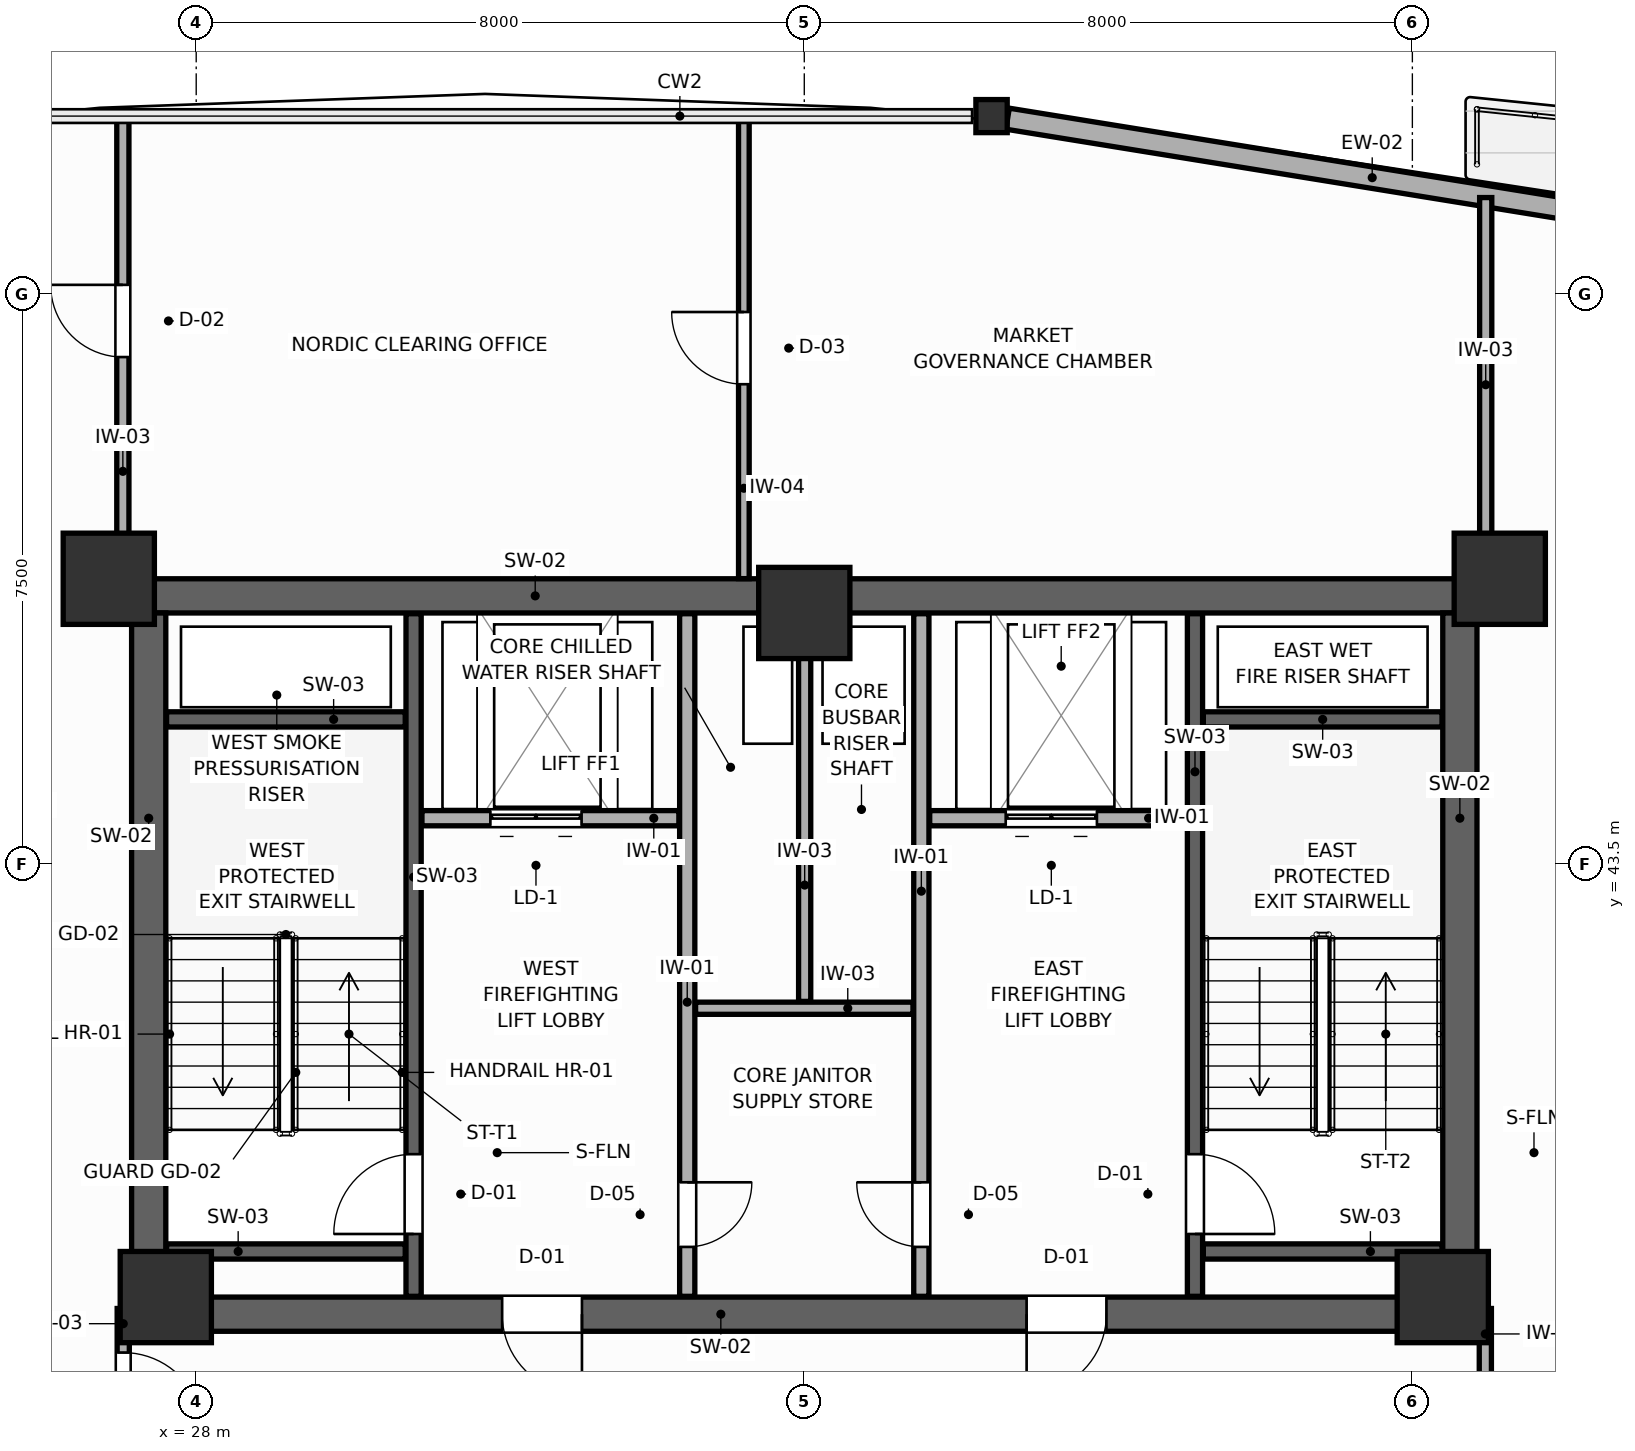
"""IFC4 building model, lengths in metres.
Left out: names, types, materials, properties, quantities, classifications, styles, units other than length and angle.
Written with IfcOpenShell. Run it as: python <this file> out.ifc"""

import sys

from ifc_helpers import new_model, si_unit, direction, frame, frame_2d, origin, origin_2d, place, context, subcontext, project, spatial, rectangle, i_section, extrude, source, transform, mapped, element, fill, save


model = new_model("IFC4")
c1 = context("Model", 3, precision=1e-05, world=origin(), true_north=direction((0.0, 1.0)))
c2 = subcontext(c1, "Body", "Model", "MODEL_VIEW")
j1 = project(units=[si_unit("LENGTHUNIT", "METRE"), si_unit("PLANEANGLEUNIT", "RADIAN")], contexts=[c1])
p1 = place(None, origin())
s1 = spatial("IfcSite", under=j1, at=p1, CompositionType="ELEMENT")
p2 = place(p1, origin())
s2 = spatial("IfcBuilding", under=s1, at=p2, CompositionType="ELEMENT")
p3 = place(p2, frame((0.0, 0.0, 136.2)))
s3 = spatial("IfcBuildingStorey", under=s2, at=p3, CompositionType="ELEMENT", Elevation=136.2)
p4 = place(p3, frame((27.15, 47.025, 0.0), z_axis=(0.0, 0.0, 1.0), x_axis=(1.0, 0.0, 0.0)))
e1 = element("IfcWall", 1, at=p4, inside=s3, PredefinedType="SHEAR", context=c2, shape_type="SweptSolid", body=[
    extrude(rectangle(XDim=17.7, YDim=0.45, at=frame_2d((8.85, 0.0))), origin(), (0.0, 0.0, 1.0), 3.6),
])
p5 = place(p3, frame((27.15, 37.575, 0.0), z_axis=(0.0, 0.0, 1.0), x_axis=(1.0, 0.0, 0.0)))
e2 = element("IfcWall", 2, at=p5, inside=s3, PredefinedType="SHEAR", context=c2, shape_type="SweptSolid", body=[
    extrude(rectangle(XDim=17.7, YDim=0.45, at=frame_2d((8.85, 0.0))), origin(), (0.0, 0.0, 1.0), 3.6),
])
p6 = place(p5, frame((4.875, 0.0, 0.0)))
e3 = element("IfcOpeningElement", 3, at=p6, cuts=e2, PredefinedType="OPENING", context=c2, shape_type="SweptSolid", body=[
    extrude(rectangle(XDim=1.05, YDim=2.1, at=frame_2d((0.525, 1.05))), frame((0.0, 0.235, 0.0), z_axis=(0.0, -1.0, 0.0), x_axis=(1.0, 0.0, 0.0)), (0.0, 0.0, 1.0), 0.47),
])
p7 = place(p5, frame((11.775, 0.0, 0.0)))
e4 = element("IfcOpeningElement", 4, at=p7, cuts=e2, PredefinedType="OPENING", context=c2, shape_type="SweptSolid", body=[
    extrude(rectangle(XDim=1.05, YDim=2.1, at=frame_2d((0.525, 1.05))), frame((0.0, 0.235, 0.0), z_axis=(0.0, -1.0, 0.0), x_axis=(1.0, 0.0, 0.0)), (0.0, 0.0, 1.0), 0.47),
])
for number, where, z_axis, x_axis in (
    (5, (27.375, 37.8, 0.0), (0.0, 0.0, 1.0), (0.0, 1.0, 0.0)),
    (6, (44.625, 37.8, 0.0), (0.0, 0.0, 1.0), (0.0, 1.0, 0.0)),
):
    element("IfcWall", number, at=place(p3, frame(where, z_axis=z_axis, x_axis=x_axis)), inside=s3, PredefinedType="SHEAR", context=c2, shape_type="SweptSolid", body=[
        extrude(rectangle(XDim=9.0, YDim=0.45, at=frame_2d((4.5, 0.0))), origin(), (0.0, 0.0, 1.0), 3.6),
    ])
m1 = source(origin(), c2, "Body", "SweptSolid", [
    extrude(rectangle(XDim=1.2, YDim=1.2, at=origin_2d()), origin(), (0.0, 0.0, 1.0), 3.6),
])
for number, where, z_axis, x_axis in (
    (7, (26.85, 47.25, 0.0), (0.0, 0.0, 1.0), (1.0, 0.0, 0.0)),
    (8, (45.15, 47.25, 0.0), (0.0, 0.0, 1.0), (1.0, 0.0, 0.0)),
    (9, (27.6, 37.8, 0.0), (0.0, 0.0, 1.0), (1.0, 0.0, 0.0)),
    (10, (44.4, 37.8, 0.0), (0.0, 0.0, 1.0), (1.0, 0.0, 0.0)),
    (11, (36.0, 46.8, 0.0), (0.0, 0.0, 1.0), (1.0, 0.0, 0.0)),
):
    element("IfcColumn", number, at=place(p3, frame(where, z_axis=z_axis, x_axis=x_axis)), inside=s3, PredefinedType="COLUMN", context=c2, shape_type="MappedRepresentation", body=[
        mapped(m1, transform((0.0, 0.0, 0.0), scale=1.0)),
    ])
m2 = source(origin(), c2, "Body", "SweptSolid", [
    extrude(i_section(OverallWidth=0.412, OverallDepth=0.435, WebThickness=0.033, FlangeThickness=0.053, FilletRadius=0.015, at=origin_2d()), origin(), (0.0, 0.0, 1.0), 3.6),
])
p8 = place(p3, frame((38.464, 53.337, 0.0), z_axis=(0.0, 0.0, 1.0), x_axis=(1.0, 0.0, 0.0)))
e12 = element("IfcColumn", 12, at=p8, inside=s3, PredefinedType="COLUMN", context=c2, shape_type="MappedRepresentation", body=[
    mapped(m2, transform((0.0, 0.0, 0.0), scale=1.0)),
])
p9 = place(p3, frame((53.646, 50.881, 0.0), z_axis=(0.0, 0.0, 1.0), x_axis=(-0.987165905884, 0.159698072185, 0.0)))
e13 = element("IfcWall", 13, at=p9, inside=s3, PredefinedType="SOLIDWALL", context=c2, shape_type="SweptSolid", body=[
    extrude(rectangle(XDim=15.165, YDim=0.28, at=frame_2d((7.583, 0.0))), origin(), (0.0, 0.0, 1.0), 3.0),
])
p10 = place(p9, frame((3.566, 0.0, 0.75)))
e14 = element("IfcOpeningElement", 14, at=p10, cuts=e13, PredefinedType="OPENING", context=c2, shape_type="SweptSolid", body=[
    extrude(rectangle(XDim=1.7, YDim=1.75, at=frame_2d((0.85, 0.875))), frame((0.0, 0.15, 0.0), z_axis=(0.0, -1.0, 0.0), x_axis=(1.0, 0.0, 0.0)), (0.0, 0.0, 1.0), 0.3),
])
p11 = place(p3, frame((30.86, 37.81, 0.0), z_axis=(0.0, 0.0, 1.0), x_axis=(0.0, 1.0, 0.0)))
e15 = element("IfcWall", 15, at=p11, inside=s3, PredefinedType="SHEAR", context=c2, shape_type="SweptSolid", body=[
    extrude(rectangle(XDim=8.98, YDim=0.2, at=frame_2d((4.49, 0.0))), origin(), (0.0, 0.0, 1.0), 3.6),
])
p12 = place(p11, frame((0.82, 0.0, 0.0)))
e16 = element("IfcOpeningElement", 16, at=p12, cuts=e15, PredefinedType="OPENING", context=c2, shape_type="SweptSolid", body=[
    extrude(rectangle(XDim=1.05, YDim=2.1, at=frame_2d((0.525, 1.05))), frame((0.0, 0.11, 0.0), z_axis=(0.0, -1.0, 0.0), x_axis=(1.0, 0.0, 0.0)), (0.0, 0.0, 1.0), 0.22),
])
for number, where, z_axis, x_axis in (
    (17, (27.61, 45.4, 0.0), (0.0, 0.0, 1.0), (1.0, 0.0, 0.0)),
    (18, (27.61, 38.4, 0.0), (0.0, 0.0, 1.0), (1.0, 0.0, 0.0)),
):
    element("IfcWall", number, at=place(p3, frame(where, z_axis=z_axis, x_axis=x_axis)), inside=s3, PredefinedType="SHEAR", context=c2, shape_type="SweptSolid", body=[
        extrude(rectangle(XDim=3.14, YDim=0.2, at=frame_2d((1.57, 0.0))), origin(), (0.0, 0.0, 1.0), 3.6),
    ])
p13 = place(p3, frame((41.14, 37.81, 0.0), z_axis=(0.0, 0.0, 1.0), x_axis=(0.0, 1.0, 0.0)))
e19 = element("IfcWall", 19, at=p13, inside=s3, PredefinedType="SHEAR", context=c2, shape_type="SweptSolid", body=[
    extrude(rectangle(XDim=8.98, YDim=0.2, at=frame_2d((4.49, 0.0))), origin(), (0.0, 0.0, 1.0), 3.6),
])
p14 = place(p13, frame((0.82, 0.0, 0.0)))
e20 = element("IfcOpeningElement", 20, at=p14, cuts=e19, PredefinedType="OPENING", context=c2, shape_type="SweptSolid", body=[
    extrude(rectangle(XDim=1.05, YDim=2.1, at=frame_2d((0.525, 1.05))), frame((0.0, 0.11, 0.0), z_axis=(0.0, -1.0, 0.0), x_axis=(1.0, 0.0, 0.0)), (0.0, 0.0, 1.0), 0.22),
])
for number, where, z_axis, x_axis in (
    (21, (41.25, 45.4, 0.0), (0.0, 0.0, 1.0), (1.0, 0.0, 0.0)),
    (22, (41.25, 38.4, 0.0), (0.0, 0.0, 1.0), (1.0, 0.0, 0.0)),
):
    element("IfcWall", number, at=place(p3, frame(where, z_axis=z_axis, x_axis=x_axis)), inside=s3, PredefinedType="SHEAR", context=c2, shape_type="SweptSolid", body=[
        extrude(rectangle(XDim=3.14, YDim=0.2, at=frame_2d((1.57, 0.0))), origin(), (0.0, 0.0, 1.0), 3.6),
    ])
p15 = place(p3, frame((30.97, 44.1, 0.0), z_axis=(0.0, 0.0, 1.0), x_axis=(1.0, 0.0, 0.0)))
e23 = element("IfcWall", 23, at=p15, inside=s3, PredefinedType="PARTITIONING", context=c2, shape_type="SweptSolid", body=[
    extrude(rectangle(XDim=3.38, YDim=0.2, at=frame_2d((1.69, 0.0))), origin(), (0.0, 0.0, 1.0), 3.4),
])
p16 = place(p15, frame((0.9, 0.0, 0.0)))
e24 = element("IfcOpeningElement", 24, at=p16, cuts=e23, PredefinedType="OPENING", context=c2, shape_type="SweptSolid", body=[
    extrude(rectangle(XDim=1.2, YDim=2.1, at=frame_2d((0.6, 1.05))), frame((0.0, 0.11, 0.0), z_axis=(0.0, -1.0, 0.0), x_axis=(1.0, 0.0, 0.0)), (0.0, 0.0, 1.0), 0.22),
])
p17 = place(p3, frame((37.65, 44.1, 0.0), z_axis=(0.0, 0.0, 1.0), x_axis=(1.0, 0.0, 0.0)))
e25 = element("IfcWall", 25, at=p17, inside=s3, PredefinedType="PARTITIONING", context=c2, shape_type="SweptSolid", body=[
    extrude(rectangle(XDim=3.38, YDim=0.2, at=frame_2d((1.69, 0.0))), origin(), (0.0, 0.0, 1.0), 3.4),
])
p18 = place(p17, frame((1.0, 0.0, 0.0)))
e26 = element("IfcOpeningElement", 26, at=p18, cuts=e25, PredefinedType="OPENING", context=c2, shape_type="SweptSolid", body=[
    extrude(rectangle(XDim=1.2, YDim=2.1, at=frame_2d((0.6, 1.05))), frame((0.0, 0.11, 0.0), z_axis=(0.0, -1.0, 0.0), x_axis=(1.0, 0.0, 0.0)), (0.0, 0.0, 1.0), 0.22),
])
p19 = place(p3, frame((34.46, 37.81, 0.0), z_axis=(0.0, 0.0, 1.0), x_axis=(0.0, 1.0, 0.0)))
e27 = element("IfcWall", 27, at=p19, inside=s3, PredefinedType="PARTITIONING", context=c2, shape_type="SweptSolid", body=[
    extrude(rectangle(XDim=8.98, YDim=0.2, at=frame_2d((4.49, 0.0))), origin(), (0.0, 0.0, 1.0), 3.4),
])
p20 = place(p19, frame((0.65, 0.0, 0.0)))
e28 = element("IfcOpeningElement", 28, at=p20, cuts=e27, PredefinedType="OPENING", context=c2, shape_type="SweptSolid", body=[
    extrude(rectangle(XDim=0.85, YDim=2.05, at=frame_2d((0.425, 1.025))), frame((0.0, 0.11, 0.0), z_axis=(0.0, -1.0, 0.0), x_axis=(1.0, 0.0, 0.0)), (0.0, 0.0, 1.0), 0.22),
])
p21 = place(p3, frame((37.54, 37.81, 0.0), z_axis=(0.0, 0.0, 1.0), x_axis=(0.0, 1.0, 0.0)))
e29 = element("IfcWall", 29, at=p21, inside=s3, PredefinedType="PARTITIONING", context=c2, shape_type="SweptSolid", body=[
    extrude(rectangle(XDim=8.98, YDim=0.2, at=frame_2d((4.49, 0.0))), origin(), (0.0, 0.0, 1.0), 3.4),
])
p22 = place(p21, frame((0.65, 0.0, 0.0)))
e30 = element("IfcOpeningElement", 30, at=p22, cuts=e29, PredefinedType="OPENING", context=c2, shape_type="SweptSolid", body=[
    extrude(rectangle(XDim=0.85, YDim=2.05, at=frame_2d((0.425, 1.025))), frame((0.0, 0.11, 0.0), z_axis=(0.0, -1.0, 0.0), x_axis=(1.0, 0.0, 0.0)), (0.0, 0.0, 1.0), 0.22),
])
p23 = place(p3, frame((34.57, 41.6, 0.0), z_axis=(0.0, 0.0, 1.0), x_axis=(1.0, 0.0, 0.0)))
e31 = element("IfcWall", 31, at=p23, inside=s3, PredefinedType="PARTITIONING", context=c2, shape_type="SweptSolid", body=[
    extrude(rectangle(XDim=2.86, YDim=0.16, at=frame_2d((1.43, 0.0))), origin(), (0.0, 0.0, 1.0), 3.4),
])
p24 = place(p3, frame((36.005, 41.69, 0.0), z_axis=(0.0, 0.0, 1.0), x_axis=(0.0, 1.0, 0.0)))
e32 = element("IfcWall", 32, at=p24, inside=s3, PredefinedType="PARTITIONING", context=c2, shape_type="SweptSolid", body=[
    extrude(rectangle(XDim=5.1, YDim=0.16, at=frame_2d((2.55, 0.0))), origin(), (0.0, 0.0, 1.0), 3.4),
])
p25 = place(p3, frame((27.04, 35.54, 0.0), z_axis=(0.0, 0.0, 1.0), x_axis=(0.0, 1.0, 0.0)))
e33 = element("IfcWall", 33, at=p25, inside=s3, PredefinedType="PARTITIONING", context=c2, shape_type="SweptSolid", body=[
    extrude(rectangle(XDim=2.11, YDim=0.16, at=frame_2d((1.055, 0.0))), origin(), (0.0, 0.0, 1.0), 3.4),
])
p26 = place(p25, frame((0.48, 0.0, 0.0)))
e34 = element("IfcOpeningElement", 34, at=p26, cuts=e33, PredefinedType="OPENING", context=c2, shape_type="SweptSolid", body=[
    extrude(rectangle(XDim=1.05, YDim=2.1, at=frame_2d((0.525, 1.05))), frame((0.0, 0.09, 0.0), z_axis=(0.0, -1.0, 0.0), x_axis=(1.0, 0.0, 0.0)), (0.0, 0.0, 1.0), 0.18),
])
p27 = place(p3, frame((44.96, 35.0, 0.0), z_axis=(0.0, 0.0, 1.0), x_axis=(0.0, 1.0, 0.0)))
e35 = element("IfcWall", 35, at=p27, inside=s3, PredefinedType="PARTITIONING", context=c2, shape_type="SweptSolid", body=[
    extrude(rectangle(XDim=2.65, YDim=0.16, at=frame_2d((1.325, 0.0))), origin(), (0.0, 0.0, 1.0), 3.4),
])
p28 = place(p27, frame((0.75, 0.0, 0.0)))
e36 = element("IfcOpeningElement", 36, at=p28, cuts=e35, PredefinedType="OPENING", context=c2, shape_type="SweptSolid", body=[
    extrude(rectangle(XDim=1.05, YDim=2.1, at=frame_2d((0.525, 1.05))), frame((0.0, 0.09, 0.0), z_axis=(0.0, -1.0, 0.0), x_axis=(1.0, 0.0, 0.0)), (0.0, 0.0, 1.0), 0.18),
])
p29 = place(p3, frame((27.035, 47.34, 0.0), z_axis=(0.0, 0.0, 1.0), x_axis=(0.0, 1.0, 0.0)))
e37 = element("IfcWall", 37, at=p29, inside=s3, PredefinedType="PARTITIONING", context=c2, shape_type="SweptSolid", body=[
    extrude(rectangle(XDim=5.977, YDim=0.16, at=frame_2d((2.988, 0.0))), origin(), (0.0, 0.0, 1.0), 3.4),
])
p30 = place(p29, frame((2.827, 0.0, 0.0)))
e38 = element("IfcOpeningElement", 38, at=p30, cuts=e37, PredefinedType="OPENING", context=c2, shape_type="SweptSolid", body=[
    extrude(rectangle(XDim=0.95, YDim=2.05, at=frame_2d((0.475, 1.025))), frame((0.0, 0.09, 0.0), z_axis=(0.0, -1.0, 0.0), x_axis=(1.0, 0.0, 0.0)), (0.0, 0.0, 1.0), 0.18),
])
p31 = place(p3, frame((44.965, 47.34, 0.0), z_axis=(0.0, 0.0, 1.0), x_axis=(0.0, 1.0, 0.0)))
e39 = element("IfcWall", 39, at=p31, inside=s3, PredefinedType="PARTITIONING", context=c2, shape_type="SweptSolid", body=[
    extrude(rectangle(XDim=4.925, YDim=0.16, at=frame_2d((2.463, 0.0))), origin(), (0.0, 0.0, 1.0), 3.4),
])
p32 = place(p3, frame((35.205, 47.252, 0.0), z_axis=(0.0, 0.0, 1.0), x_axis=(0.0, 1.0, 0.0)))
e40 = element("IfcWall", 40, at=p32, inside=s3, PredefinedType="PARTITIONING", context=c2, shape_type="SweptSolid", body=[
    extrude(rectangle(XDim=6.065, YDim=0.14, at=frame_2d((3.032, 0.0))), origin(), (0.0, 0.0, 1.0), 3.4),
])
p33 = place(p32, frame((2.558, 0.0, 0.0)))
e41 = element("IfcOpeningElement", 41, at=p33, cuts=e40, PredefinedType="OPENING", context=c2, shape_type="SweptSolid", body=[
    extrude(rectangle(XDim=0.95, YDim=2.05, at=frame_2d((0.475, 1.025))), frame((0.0, 0.08, 0.0), z_axis=(0.0, -1.0, 0.0), x_axis=(1.0, 0.0, 0.0)), (0.0, 0.0, 1.0), 0.16),
])
p34 = place(p12, origin())
e42 = element("IfcDoor", 42, at=p34, inside=s3, OperationType="SINGLE_SWING_LEFT", PredefinedType="DOOR", context=c2, shape_type="SweptSolid", body=[
    extrude(rectangle(XDim=1.05, YDim=2.1, at=frame_2d((0.525, 1.05))), frame((0.0, 0.025, 0.0), z_axis=(0.0, -1.0, 0.0), x_axis=(1.0, 0.0, 0.0)), (0.0, 0.0, 1.0), 0.05),
])
fill(e16, e42)
p35 = place(p14, frame((1.05, 0.0, 0.0), z_axis=(0.0, 0.0, 1.0), x_axis=(-1.0, 0.0, 0.0)))
e43 = element("IfcDoor", 43, at=p35, inside=s3, OperationType="SINGLE_SWING_RIGHT", PredefinedType="DOOR", context=c2, shape_type="SweptSolid", body=[
    extrude(rectangle(XDim=1.05, YDim=2.1, at=frame_2d((0.525, 1.05))), frame((0.0, 0.025, 0.0), z_axis=(0.0, -1.0, 0.0), x_axis=(1.0, 0.0, 0.0)), (0.0, 0.0, 1.0), 0.05),
])
fill(e20, e43)
p36 = place(p16, origin())
e44 = element("IfcDoor", 44, at=p36, inside=s3, OperationType="DOUBLE_DOOR_SLIDING", PredefinedType="DOOR", context=c2, shape_type="SweptSolid", body=[
    extrude(rectangle(XDim=1.2, YDim=2.1, at=frame_2d((0.6, 1.05))), frame((0.0, 0.025, 0.0), z_axis=(0.0, -1.0, 0.0), x_axis=(1.0, 0.0, 0.0)), (0.0, 0.0, 1.0), 0.05),
])
fill(e24, e44)
p37 = place(p18, origin())
e45 = element("IfcDoor", 45, at=p37, inside=s3, OperationType="DOUBLE_DOOR_SLIDING", PredefinedType="DOOR", context=c2, shape_type="SweptSolid", body=[
    extrude(rectangle(XDim=1.2, YDim=2.1, at=frame_2d((0.6, 1.05))), frame((0.0, 0.025, 0.0), z_axis=(0.0, -1.0, 0.0), x_axis=(1.0, 0.0, 0.0)), (0.0, 0.0, 1.0), 0.05),
])
fill(e26, e45)
p38 = place(p20, frame((0.85, 0.0, 0.0), z_axis=(0.0, 0.0, 1.0), x_axis=(-1.0, 0.0, 0.0)))
e46 = element("IfcDoor", 46, at=p38, inside=s3, OperationType="SINGLE_SWING_LEFT", PredefinedType="DOOR", context=c2, shape_type="SweptSolid", body=[
    extrude(rectangle(XDim=0.85, YDim=2.05, at=frame_2d((0.425, 1.025))), frame((0.0, 0.025, 0.0), z_axis=(0.0, -1.0, 0.0), x_axis=(1.0, 0.0, 0.0)), (0.0, 0.0, 1.0), 0.05),
])
fill(e28, e46)
p39 = place(p22, origin())
e47 = element("IfcDoor", 47, at=p39, inside=s3, OperationType="SINGLE_SWING_RIGHT", PredefinedType="DOOR", context=c2, shape_type="SweptSolid", body=[
    extrude(rectangle(XDim=0.85, YDim=2.05, at=frame_2d((0.425, 1.025))), frame((0.0, 0.025, 0.0), z_axis=(0.0, -1.0, 0.0), x_axis=(1.0, 0.0, 0.0)), (0.0, 0.0, 1.0), 0.05),
])
fill(e30, e47)
p40 = place(p26, frame((1.05, 0.0, 0.0), z_axis=(0.0, 0.0, 1.0), x_axis=(-1.0, 0.0, 0.0)))
e48 = element("IfcDoor", 48, at=p40, inside=s3, OperationType="SINGLE_SWING_RIGHT", PredefinedType="DOOR", context=c2, shape_type="SweptSolid", body=[
    extrude(rectangle(XDim=1.05, YDim=2.1, at=frame_2d((0.525, 1.05))), frame((0.0, 0.025, 0.0), z_axis=(0.0, -1.0, 0.0), x_axis=(1.0, 0.0, 0.0)), (0.0, 0.0, 1.0), 0.05),
])
fill(e34, e48)
p41 = place(p30, origin())
e49 = element("IfcDoor", 49, at=p41, inside=s3, OperationType="SINGLE_SWING_RIGHT", PredefinedType="DOOR", context=c2, shape_type="SweptSolid", body=[
    extrude(rectangle(XDim=0.95, YDim=2.05, at=frame_2d((0.475, 1.025))), frame((0.0, 0.025, 0.0), z_axis=(0.0, -1.0, 0.0), x_axis=(1.0, 0.0, 0.0)), (0.0, 0.0, 1.0), 0.05),
])
fill(e38, e49)
p42 = place(p33, origin())
e50 = element("IfcDoor", 50, at=p42, inside=s3, OperationType="SINGLE_SWING_RIGHT", PredefinedType="DOOR", context=c2, shape_type="SweptSolid", body=[
    extrude(rectangle(XDim=0.95, YDim=2.05, at=frame_2d((0.475, 1.025))), frame((0.0, 0.025, 0.0), z_axis=(0.0, -1.0, 0.0), x_axis=(1.0, 0.0, 0.0)), (0.0, 0.0, 1.0), 0.05),
])
fill(e41, e50)
p43 = place(p6, frame((1.05, 0.0, 0.0), z_axis=(0.0, 0.0, 1.0), x_axis=(-1.0, 0.0, 0.0)))
e51 = element("IfcDoor", 51, at=p43, inside=s3, OperationType="SINGLE_SWING_LEFT", PredefinedType="DOOR", context=c2, shape_type="SweptSolid", body=[
    extrude(rectangle(XDim=1.05, YDim=2.1, at=frame_2d((0.525, 1.05))), frame((0.0, 0.025, 0.0), z_axis=(0.0, -1.0, 0.0), x_axis=(1.0, 0.0, 0.0)), (0.0, 0.0, 1.0), 0.05),
])
fill(e3, e51)
p44 = place(p7, frame((1.05, 0.0, 0.0), z_axis=(0.0, 0.0, 1.0), x_axis=(-1.0, 0.0, 0.0)))
e52 = element("IfcDoor", 52, at=p44, inside=s3, OperationType="SINGLE_SWING_RIGHT", PredefinedType="DOOR", context=c2, shape_type="SweptSolid", body=[
    extrude(rectangle(XDim=1.05, YDim=2.1, at=frame_2d((0.525, 1.05))), frame((0.0, 0.025, 0.0), z_axis=(0.0, -1.0, 0.0), x_axis=(1.0, 0.0, 0.0)), (0.0, 0.0, 1.0), 0.05),
])
fill(e4, e52)
save(model, sys.argv[1])
